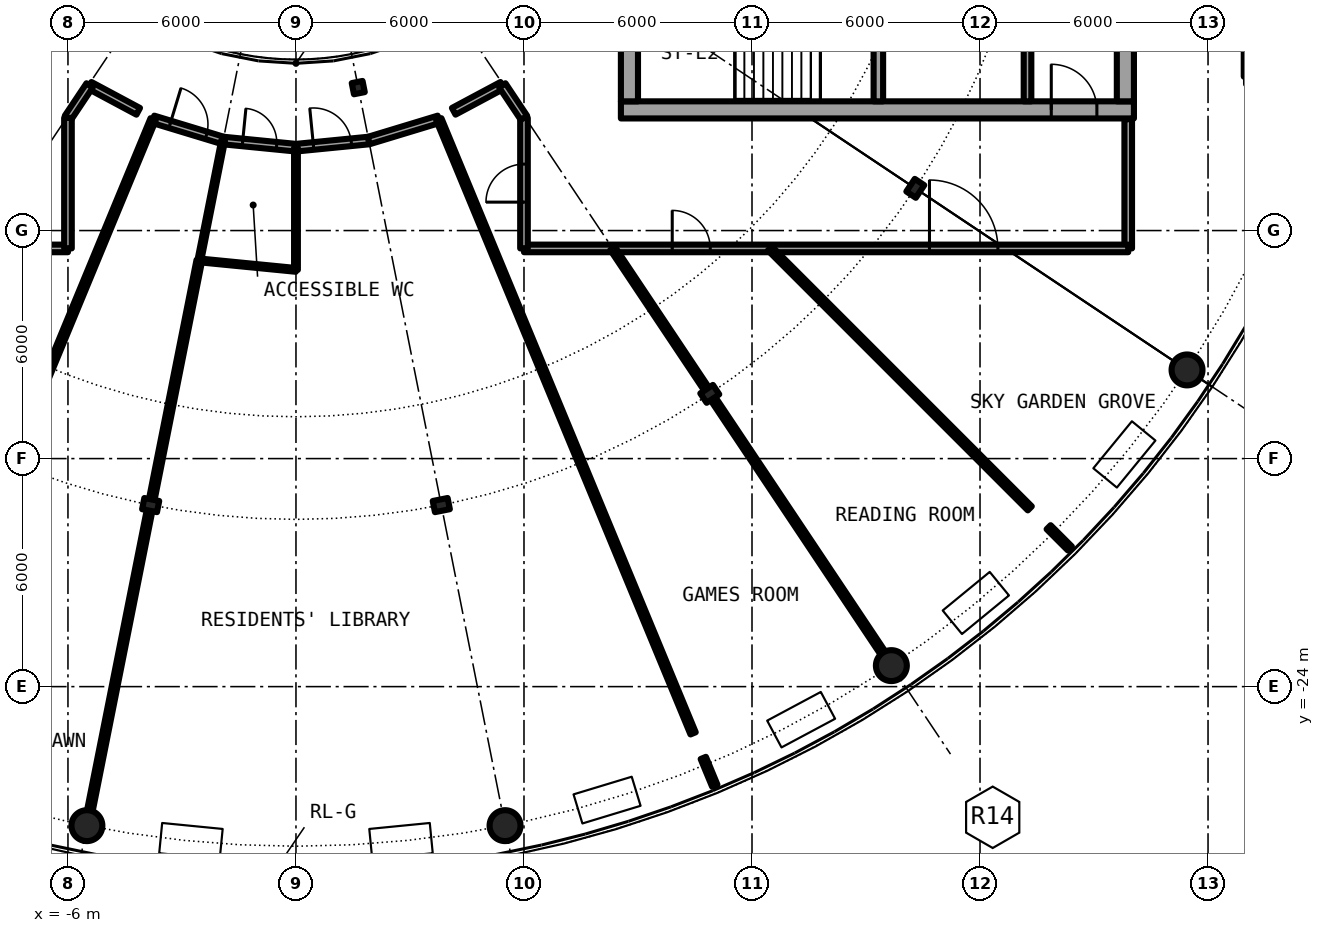
"""IFC4 building model, lengths in metres.
Left out: names, types, materials, properties, quantities, classifications, styles, units other than length and angle.
Written with IfcOpenShell. Run it as: python <this file> out.ifc"""

import sys

from ifc_helpers import new_model, si_unit, direction, frame, frame_2d, origin, origin_2d, place, context, subcontext, project, spatial, rectangle, hollow_circle, i_section, extrude, element, fill, save


model = new_model("IFC4")
c1 = context("Model", 3, precision=1e-05, world=origin(), true_north=direction((0.0, 1.0)))
c2 = subcontext(c1, "Body", "Model", "MODEL_VIEW")
j1 = project(units=[si_unit("LENGTHUNIT", "METRE"), si_unit("PLANEANGLEUNIT", "RADIAN")], contexts=[c1])
p1 = place(None, origin())
s1 = spatial("IfcSite", under=j1, at=p1, CompositionType="ELEMENT")
p2 = place(p1, origin())
s2 = spatial("IfcBuilding", under=s1, at=p2, CompositionType="ELEMENT")
p3 = place(p2, frame((0.0, 0.0, 221.85)))
s3 = spatial("IfcBuildingStorey", under=s2, at=p3, CompositionType="ELEMENT", Elevation=221.85)
for number, where, z_axis, x_axis in (
    (1, (-5.501, -27.658, 0.0), (0.0, 0.0, 1.0), (1.0, 0.0, 0.0)),
    (2, (5.501, -27.658, 0.0), (0.0, 0.0, 1.0), (1.0, 0.0, 0.0)),
    (3, (15.667, -23.448, 0.0), (0.0, 0.0, 1.0), (1.0, 0.0, 0.0)),
    (4, (23.448, -15.667, 0.0), (0.0, 0.0, 1.0), (1.0, 0.0, 0.0)),
):
    element("IfcColumn", number, at=place(p3, frame(where, z_axis=z_axis, x_axis=x_axis)), inside=s3, PredefinedType="COLUMN", context=c2, shape_type="SweptSolid", body=[
        extrude(hollow_circle(Radius=0.406, WallThickness=0.03, at=origin_2d()), origin(), (0.0, 0.0, 1.0), 6.1),
    ])
for number, where, z_axis, x_axis in (
    (5, (-3.824, -19.223, 0.0), (0.0, 0.0, 1.0), (-0.195, -0.981, 0.0)),
    (6, (3.824, -19.223, 0.0), (0.0, 0.0, 1.0), (0.195, -0.981, 0.0)),
    (7, (10.889, -16.297, 0.0), (0.0, 0.0, 1.0), (0.556, -0.831, 0.0)),
    (8, (16.297, -10.889, 0.0), (0.0, 0.0, 1.0), (0.831, -0.556, 0.0)),
):
    element("IfcColumn", number, at=place(p3, frame(where, z_axis=z_axis, x_axis=x_axis)), inside=s3, PredefinedType="COLUMN", context=c2, shape_type="SweptSolid", body=[
        extrude(i_section(OverallWidth=0.3, OverallDepth=0.4, WebThickness=0.013, FlangeThickness=0.024, FilletRadius=0.027, at=origin_2d()), origin(), (0.0, 0.0, 1.0), 6.1),
    ])
p4 = place(p3, frame((1.639, -8.239, 0.0), z_axis=(0.0, 0.0, 1.0), x_axis=(0.195090322016, -0.980785280403, 0.0)))
e9 = element("IfcColumn", 9, at=p4, inside=s3, PredefinedType="COLUMN", context=c2, shape_type="SweptSolid", body=[
    extrude(i_section(OverallWidth=0.3, OverallDepth=0.29, WebThickness=0.009, FlangeThickness=0.014, FilletRadius=0.027, at=origin_2d()), origin(), (0.0, 0.0, 1.0), 6.1),
])
p5 = place(p3, frame((8.55, -8.825, 0.0), z_axis=(0.0, 0.0, 1.0), x_axis=(1.0, 0.0, 0.0)))
e10 = element("IfcWall", 10, at=p5, inside=s3, PredefinedType="SHEAR", context=c2, shape_type="SweptSolid", body=[
    extrude(rectangle(XDim=13.5, YDim=0.45, at=frame_2d((6.75, 0.0))), origin(), (0.0, 0.0, 1.0), 6.1),
])
p6 = place(p5, frame((11.325, 0.0, 0.0)))
e11 = element("IfcOpeningElement", 11, at=p6, cuts=e10, PredefinedType="OPENING", context=c2, shape_type="SweptSolid", body=[
    extrude(rectangle(XDim=1.2, YDim=2.3, at=frame_2d((0.6, 1.15))), frame((0.0, 0.235, 0.0), z_axis=(0.0, -1.0, 0.0), x_axis=(1.0, 0.0, 0.0)), (0.0, 0.0, 1.0), 0.47),
])
p7 = place(p3, frame((21.825, 8.6, 0.0), z_axis=(0.0, 0.0, 1.0), x_axis=(0.0, -1.0, 0.0)))
e12 = element("IfcWall", 12, at=p7, inside=s3, PredefinedType="SHEAR", context=c2, shape_type="SweptSolid", body=[
    extrude(rectangle(XDim=17.2, YDim=0.45, at=frame_2d((8.6, 0.0))), origin(), (0.0, 0.0, 1.0), 6.1),
])
p8 = place(p7, frame((7.4, 0.0, 0.0)))
e13 = element("IfcOpeningElement", 13, at=p8, cuts=e12, PredefinedType="OPENING", context=c2, shape_type="SweptSolid", body=[
    extrude(rectangle(XDim=2.4, YDim=2.3, at=frame_2d((1.2, 1.15))), frame((0.0, 0.235, 0.0), z_axis=(0.0, -1.0, 0.0), x_axis=(1.0, 0.0, 0.0)), (0.0, 0.0, 1.0), 0.47),
])
p9 = place(p3, frame((8.775, -8.6, 0.0), z_axis=(0.0, 0.0, 1.0), x_axis=(0.0, 1.0, 0.0)))
e14 = element("IfcWall", 14, at=p9, inside=s3, PredefinedType="SHEAR", context=c2, shape_type="SweptSolid", body=[
    extrude(rectangle(XDim=17.2, YDim=0.45, at=frame_2d((8.6, 0.0))), origin(), (0.0, 0.0, 1.0), 6.1),
])
p10 = place(p9, frame((7.4, 0.0, 0.1)))
e15 = element("IfcOpeningElement", 15, at=p10, cuts=e14, PredefinedType="OPENING", context=c2, shape_type="SweptSolid", body=[
    extrude(rectangle(XDim=2.4, YDim=2.2, at=frame_2d((1.2, 1.1))), frame((0.0, 0.235, 0.0), z_axis=(0.0, -1.0, 0.0), x_axis=(1.0, 0.0, 0.0)), (0.0, 0.0, 1.0), 0.47),
])
p11 = place(p3, frame((15.325, -8.6, 0.0), z_axis=(0.0, 0.0, 1.0), x_axis=(0.0, 1.0, 0.0)))
e16 = element("IfcWall", 16, at=p11, inside=s3, PredefinedType="SHEAR", context=c2, shape_type="SweptSolid", body=[
    extrude(rectangle(XDim=3.95, YDim=0.25, at=frame_2d((1.975, 0.0))), origin(), (0.0, 0.0, 1.0), 6.1),
])
p12 = place(p11, frame((2.025, 0.0, 0.0)))
e17 = element("IfcOpeningElement", 17, at=p12, cuts=e16, PredefinedType="OPENING", context=c2, shape_type="SweptSolid", body=[
    extrude(rectangle(XDim=1.2, YDim=2.3, at=frame_2d((0.6, 1.15))), frame((0.0, 0.135, 0.0), z_axis=(0.0, -1.0, 0.0), x_axis=(1.0, 0.0, 0.0)), (0.0, 0.0, 1.0), 0.27),
])
p13 = place(p3, frame((19.25, -8.6, 0.0), z_axis=(0.0, 0.0, 1.0), x_axis=(0.0, 1.0, 0.0)))
e18 = element("IfcWall", 18, at=p13, inside=s3, PredefinedType="SOLIDWALL", context=c2, shape_type="SweptSolid", body=[
    extrude(rectangle(XDim=7.025, YDim=0.2, at=frame_2d((3.513, 0.0))), origin(), (0.0, 0.0, 1.0), 5.75),
])
p14 = place(p13, frame((2.35, 0.0, 0.0)))
e19 = element("IfcOpeningElement", 19, at=p14, cuts=e18, PredefinedType="OPENING", context=c2, shape_type="SweptSolid", body=[
    extrude(rectangle(XDim=1.1, YDim=2.3, at=frame_2d((0.55, 1.15))), frame((0.0, 0.11, 0.0), z_axis=(0.0, -1.0, 0.0), x_axis=(1.0, 0.0, 0.0)), (0.0, 0.0, 1.0), 0.22),
])
p15 = place(p3, frame((25.0, -3.5, 0.0), z_axis=(0.0, 0.0, 1.0), x_axis=(0.0, -1.0, 0.0)))
e20 = element("IfcWall", 20, at=p15, inside=s3, PredefinedType="PARTITIONING", context=c2, shape_type="SweptSolid", body=[
    extrude(rectangle(XDim=4.45, YDim=0.12, at=frame_2d((2.225, 0.0))), origin(), (0.0, 0.0, 1.0), 5.75),
])
p16 = place(p15, frame((0.4, 0.0, 0.1)))
e21 = element("IfcOpeningElement", 21, at=p16, cuts=e20, PredefinedType="OPENING", context=c2, shape_type="SweptSolid", body=[
    extrude(rectangle(XDim=3.6, YDim=5.4, at=frame_2d((1.8, 2.7))), frame((0.0, 0.07, 0.0), z_axis=(0.0, -1.0, 0.0), x_axis=(1.0, 0.0, 0.0)), (0.0, 0.0, 1.0), 0.14),
])
p17 = place(p3, frame((21.9, -12.47, 0.0), z_axis=(0.0, 0.0, 1.0), x_axis=(0.0, 1.0, 0.0)))
e22 = element("IfcWall", 22, at=p17, inside=s3, PredefinedType="PARTITIONING", context=c2, shape_type="SweptSolid", body=[
    extrude(rectangle(XDim=3.4, YDim=0.2, at=frame_2d((1.7, 0.0))), origin(), (0.0, 0.0, 1.0), 5.75),
])
p18 = place(p3, frame((-2.543, -12.785, 0.0), z_axis=(0.0, 0.0, 1.0), x_axis=(0.995202292453, -0.09783862783, 0.0)))
e23 = element("IfcWall", 23, at=p18, inside=s3, PredefinedType="PARTITIONING", context=c2, shape_type="SweptSolid", body=[
    extrude(rectangle(XDim=2.555, YDim=0.1, at=frame_2d((1.278, 0.0))), origin(), (0.0, 0.0, 1.0), 5.75),
])
p19 = place(p3, frame((-21.9, -12.47, 0.0), z_axis=(0.0, 0.0, 1.0), x_axis=(1.0, 0.0, 0.0)))
e24 = element("IfcWall", 24, at=p19, inside=s3, PredefinedType="PARTITIONING", context=c2, shape_type="SweptSolid", body=[
    extrude(rectangle(XDim=15.9, YDim=0.2, at=frame_2d((7.95, 0.0))), origin(), (0.0, 0.0, 1.0), 5.75),
])
p20 = place(p19, frame((12.165, 0.0, 0.0)))
e25 = element("IfcOpeningElement", 25, at=p20, cuts=e24, PredefinedType="OPENING", context=c2, shape_type="SweptSolid", body=[
    extrude(rectangle(XDim=1.0, YDim=2.3, at=frame_2d((0.5, 1.15))), frame((0.0, 0.11, 0.0), z_axis=(0.0, -1.0, 0.0), x_axis=(1.0, 0.0, 0.0)), (0.0, 0.0, 1.0), 0.22),
])
p21 = place(p19, frame((3.387, 0.0, 0.0)))
e26 = element("IfcOpeningElement", 26, at=p21, cuts=e24, PredefinedType="OPENING", context=c2, shape_type="SweptSolid", body=[
    extrude(rectangle(XDim=1.8, YDim=2.3, at=frame_2d((0.9, 1.15))), frame((0.0, 0.11, 0.0), z_axis=(0.0, -1.0, 0.0), x_axis=(1.0, 0.0, 0.0)), (0.0, 0.0, 1.0), 0.22),
])
p22 = place(p3, frame((6.0, -12.47, 0.0), z_axis=(0.0, 0.0, 1.0), x_axis=(1.0, 0.0, 0.0)))
e27 = element("IfcWall", 27, at=p22, inside=s3, PredefinedType="PARTITIONING", context=c2, shape_type="SweptSolid", body=[
    extrude(rectangle(XDim=15.9, YDim=0.2, at=frame_2d((7.95, 0.0))), origin(), (0.0, 0.0, 1.0), 5.75),
])
p23 = place(p22, frame((3.901, 0.0, 0.0)))
e28 = element("IfcOpeningElement", 28, at=p23, cuts=e27, PredefinedType="OPENING", context=c2, shape_type="SweptSolid", body=[
    extrude(rectangle(XDim=1.0, YDim=2.3, at=frame_2d((0.5, 1.15))), frame((0.0, 0.11, 0.0), z_axis=(0.0, -1.0, 0.0), x_axis=(1.0, 0.0, 0.0)), (0.0, 0.0, 1.0), 0.22),
])
p24 = place(p22, frame((10.67, 0.0, 0.0)))
e29 = element("IfcOpeningElement", 29, at=p24, cuts=e27, PredefinedType="OPENING", context=c2, shape_type="SweptSolid", body=[
    extrude(rectangle(XDim=1.8, YDim=2.3, at=frame_2d((0.9, 1.15))), frame((0.0, 0.11, 0.0), z_axis=(0.0, -1.0, 0.0), x_axis=(1.0, 0.0, 0.0)), (0.0, 0.0, 1.0), 0.22),
])
p25 = place(p3, frame((-5.429, -8.179, 0.0), z_axis=(0.0, 0.0, 1.0), x_axis=(0.881652665802, -0.471898905364, 0.0)))
e30 = element("IfcWall", 30, at=p25, inside=s3, PredefinedType="PARTITIONING", context=c2, shape_type="SweptSolid", body=[
    extrude(rectangle(XDim=1.45, YDim=0.2, at=frame_2d((0.725, 0.0))), origin(), (0.0, 0.0, 1.0), 5.75),
])
p26 = place(p3, frame((-3.758, -9.072, 0.0), z_axis=(0.0, 0.0, 1.0), x_axis=(0.956896312675, -0.29042976223, 0.0)))
e31 = element("IfcWall", 31, at=p26, inside=s3, PredefinedType="PARTITIONING", context=c2, shape_type="SweptSolid", body=[
    extrude(rectangle(XDim=1.925, YDim=0.2, at=frame_2d((0.962, 0.0))), origin(), (0.0, 0.0, 1.0), 5.75),
])
p27 = place(p26, frame((0.462, 0.0, 0.0)))
e32 = element("IfcOpeningElement", 32, at=p27, cuts=e31, PredefinedType="OPENING", context=c2, shape_type="SweptSolid", body=[
    extrude(rectangle(XDim=1.0, YDim=2.3, at=frame_2d((0.5, 1.15))), frame((0.0, 0.11, 0.0), z_axis=(0.0, -1.0, 0.0), x_axis=(1.0, 0.0, 0.0)), (0.0, 0.0, 1.0), 0.22),
])
p28 = place(p3, frame((-1.916, -9.631, 0.0), z_axis=(0.0, 0.0, 1.0), x_axis=(0.995171860647, -0.098147683504, 0.0)))
e33 = element("IfcWall", 33, at=p28, inside=s3, PredefinedType="PARTITIONING", context=c2, shape_type="SweptSolid", body=[
    extrude(rectangle(XDim=1.925, YDim=0.2, at=frame_2d((0.963, 0.0))), origin(), (0.0, 0.0, 1.0), 5.75),
])
p29 = place(p28, frame((0.513, 0.0, 0.0)))
e34 = element("IfcOpeningElement", 34, at=p29, cuts=e33, PredefinedType="OPENING", context=c2, shape_type="SweptSolid", body=[
    extrude(rectangle(XDim=0.9, YDim=2.3, at=frame_2d((0.45, 1.15))), frame((0.0, 0.11, 0.0), z_axis=(0.0, -1.0, 0.0), x_axis=(1.0, 0.0, 0.0)), (0.0, 0.0, 1.0), 0.22),
])
p30 = place(p3, frame((0.0, -9.82, 0.0), z_axis=(0.0, 0.0, 1.0), x_axis=(0.995171860647, 0.098147683504, 0.0)))
e35 = element("IfcWall", 35, at=p30, inside=s3, PredefinedType="PARTITIONING", context=c2, shape_type="SweptSolid", body=[
    extrude(rectangle(XDim=1.925, YDim=0.2, at=frame_2d((0.963, 0.0))), origin(), (0.0, 0.0, 1.0), 5.75),
])
p31 = place(p30, frame((0.463, 0.0, 0.0)))
e36 = element("IfcOpeningElement", 36, at=p31, cuts=e35, PredefinedType="OPENING", context=c2, shape_type="SweptSolid", body=[
    extrude(rectangle(XDim=1.0, YDim=2.3, at=frame_2d((0.5, 1.15))), frame((0.0, 0.11, 0.0), z_axis=(0.0, -1.0, 0.0), x_axis=(1.0, 0.0, 0.0)), (0.0, 0.0, 1.0), 0.22),
])
p32 = place(p3, frame((1.916, -9.631, 0.0), z_axis=(0.0, 0.0, 1.0), x_axis=(0.956896312675, 0.29042976223, 0.0)))
e37 = element("IfcWall", 37, at=p32, inside=s3, PredefinedType="PARTITIONING", context=c2, shape_type="SweptSolid", body=[
    extrude(rectangle(XDim=1.925, YDim=0.2, at=frame_2d((0.962, 0.0))), origin(), (0.0, 0.0, 1.0), 5.75),
])
p33 = place(p3, frame((4.151, -8.862, 0.0), z_axis=(0.0, 0.0, 1.0), x_axis=(0.88193287619, 0.471375011954, 0.0)))
e38 = element("IfcWall", 38, at=p33, inside=s3, PredefinedType="PARTITIONING", context=c2, shape_type="SweptSolid", body=[
    extrude(rectangle(XDim=1.449, YDim=0.2, at=frame_2d((0.725, 0.0))), origin(), (0.0, 0.0, 1.0), 5.75),
])
p34 = place(p3, frame((6.0, -12.47, 0.0), z_axis=(0.0, 0.0, 1.0), x_axis=(0.0, 1.0, 0.0)))
e39 = element("IfcWall", 39, at=p34, inside=s3, PredefinedType="PARTITIONING", context=c2, shape_type="SweptSolid", body=[
    extrude(rectangle(XDim=3.436, YDim=0.2, at=frame_2d((1.718, 0.0))), origin(), (0.0, 0.0, 1.0), 5.75),
])
p35 = place(p34, frame((1.218, 0.0, 0.0)))
e40 = element("IfcOpeningElement", 40, at=p35, cuts=e39, PredefinedType="OPENING", context=c2, shape_type="SweptSolid", body=[
    extrude(rectangle(XDim=1.0, YDim=2.3, at=frame_2d((0.5, 1.15))), frame((0.0, 0.11, 0.0), z_axis=(0.0, -1.0, 0.0), x_axis=(1.0, 0.0, 0.0)), (0.0, 0.0, 1.0), 0.22),
])
for number, where, z_axis, x_axis in (
    (41, (-6.0, -9.034, 0.0), (0.0, 0.0, 1.0), (0.555, 0.832, 0.0)),
    (42, (5.429, -8.179, 0.0), (0.0, 0.0, 1.0), (0.555, -0.832, 0.0)),
):
    element("IfcWall", number, at=place(p3, frame(where, z_axis=z_axis, x_axis=x_axis)), inside=s3, PredefinedType="PARTITIONING", context=c2, shape_type="SweptSolid", body=[
        extrude(rectangle(XDim=1.028, YDim=0.2, at=frame_2d((0.514, 0.0))), origin(), (0.0, 0.0, 1.0), 5.75),
    ])
p36 = place(p3, frame((-10.45, -25.23, 0.0), z_axis=(0.0, 0.0, 1.0), x_axis=(0.382637007118, 0.923898761112, 0.0)))
e43 = element("IfcWall", 43, at=p36, inside=s3, PredefinedType="PARTITIONING", context=c2, shape_type="SweptSolid", body=[
    extrude(rectangle(XDim=17.489, YDim=0.15, at=frame_2d((8.744, 0.0))), origin(), (0.0, 0.0, 1.0), 5.75),
])
p37 = place(p3, frame((-5.424, -27.267, 0.0), z_axis=(0.0, 0.0, 1.0), x_axis=(0.195106720959, 0.980782018308, 0.0)))
e44 = element("IfcWall", 44, at=p37, inside=s3, PredefinedType="PARTITIONING", context=c2, shape_type="SweptSolid", body=[
    extrude(rectangle(XDim=8.001, YDim=0.15, at=frame_2d((4.0, 0.0))), origin(), (0.0, 0.0, 1.0), 5.75),
])
p38 = place(p3, frame((-3.785, -19.027, 0.0), z_axis=(0.0, 0.0, 1.0), x_axis=(0.195134918279, 0.980776408601, 0.0)))
e45 = element("IfcWall", 45, at=p38, inside=s3, PredefinedType="PARTITIONING", context=c2, shape_type="SweptSolid", body=[
    extrude(rectangle(XDim=6.365, YDim=0.15, at=frame_2d((3.182, 0.0))), origin(), (0.0, 0.0, 1.0), 5.75),
])
p39 = place(p3, frame((-2.543, -12.785, 0.0), z_axis=(0.0, 0.0, 1.0), x_axis=(0.194977117829, 0.980807791325, 0.0)))
e46 = element("IfcWall", 46, at=p39, inside=s3, PredefinedType="PARTITIONING", context=c2, shape_type="SweptSolid", body=[
    extrude(rectangle(XDim=3.216, YDim=0.1, at=frame_2d((1.608, 0.0))), origin(), (0.0, 0.0, 1.0), 5.75),
])
p40 = place(p3, frame((0.0, -13.035, 0.0), z_axis=(0.0, 0.0, 1.0), x_axis=(0.0, 1.0, 0.0)))
e47 = element("IfcWall", 47, at=p40, inside=s3, PredefinedType="PARTITIONING", context=c2, shape_type="SweptSolid", body=[
    extrude(rectangle(XDim=3.215, YDim=0.1, at=frame_2d((1.607, 0.0))), origin(), (0.0, 0.0, 1.0), 5.75),
])
p41 = place(p3, frame((3.758, -9.072, 0.0), z_axis=(0.0, 0.0, 1.0), x_axis=(0.382637007118, -0.923898761112, 0.0)))
e48 = element("IfcWall", 48, at=p41, inside=s3, PredefinedType="PARTITIONING", context=c2, shape_type="SweptSolid", body=[
    extrude(rectangle(XDim=17.489, YDim=0.15, at=frame_2d((8.744, 0.0))), origin(), (0.0, 0.0, 1.0), 5.75),
])
p42 = place(p3, frame((8.332, -12.47, 0.0), z_axis=(0.0, 0.0, 1.0), x_axis=(0.555531636289, -0.831495400518, 0.0)))
e49 = element("IfcWall", 49, at=p42, inside=s3, PredefinedType="PARTITIONING", context=c2, shape_type="SweptSolid", body=[
    extrude(rectangle(XDim=4.403, YDim=0.15, at=frame_2d((2.202, 0.0))), origin(), (0.0, 0.0, 1.0), 5.75),
])
p43 = place(p3, frame((10.718, -25.876, 0.0), z_axis=(0.0, 0.0, 1.0), x_axis=(0.382469748433, -0.923968014345, 0.0)))
e50 = element("IfcWall", 50, at=p43, inside=s3, PredefinedType="PARTITIONING", context=c2, shape_type="SweptSolid", body=[
    extrude(rectangle(XDim=0.792, YDim=0.15, at=frame_2d((0.396, 0.0))), origin(), (0.0, 0.0, 1.0), 5.75),
])
p44 = place(p3, frame((11.0, -16.463, 0.0), z_axis=(0.0, 0.0, 1.0), x_axis=(0.555537830231, -0.831491262241, 0.0)))
e51 = element("IfcWall", 51, at=p44, inside=s3, PredefinedType="PARTITIONING", context=c2, shape_type="SweptSolid", body=[
    extrude(rectangle(XDim=8.001, YDim=0.15, at=frame_2d((4.001, 0.0))), origin(), (0.0, 0.0, 1.0), 5.75),
])
p45 = place(p3, frame((12.47, -12.47, 0.0), z_axis=(0.0, 0.0, 1.0), x_axis=(0.707106781187, -0.707106781187, 0.0)))
e52 = element("IfcWall", 52, at=p45, inside=s3, PredefinedType="PARTITIONING", context=c2, shape_type="SweptSolid", body=[
    extrude(rectangle(XDim=9.673, YDim=0.15, at=frame_2d((4.837, 0.0))), origin(), (0.0, 0.0, 1.0), 5.75),
])
p46 = place(p3, frame((19.805, -19.805, 0.0), z_axis=(0.0, 0.0, 1.0), x_axis=(0.707106781187, -0.707106781187, 0.0)))
e53 = element("IfcWall", 53, at=p46, inside=s3, PredefinedType="PARTITIONING", context=c2, shape_type="SweptSolid", body=[
    extrude(rectangle(XDim=0.792, YDim=0.15, at=frame_2d((0.396, 0.0))), origin(), (0.0, 0.0, 1.0), 5.75),
])
p47 = place(p3, frame((-6.0, -12.47, 0.0), z_axis=(0.0, 0.0, 1.0), x_axis=(0.0, 1.0, 0.0)))
e54 = element("IfcWall", 54, at=p47, inside=s3, PredefinedType="PARTITIONING", context=c2, shape_type="SweptSolid", body=[
    extrude(rectangle(XDim=3.436, YDim=0.2, at=frame_2d((1.718, 0.0))), origin(), (0.0, 0.0, 1.0), 5.75),
])
p48 = place(p6, origin())
e55 = element("IfcDoor", 55, at=p48, inside=s3, OperationType="SINGLE_SWING_LEFT", PredefinedType="DOOR", context=c2, shape_type="SweptSolid", body=[
    extrude(rectangle(XDim=1.2, YDim=2.3, at=frame_2d((0.6, 1.15))), frame((0.0, 0.025, 0.0), z_axis=(0.0, -1.0, 0.0), x_axis=(1.0, 0.0, 0.0)), (0.0, 0.0, 1.0), 0.05),
])
fill(e11, e55)
p49 = place(p29, origin())
e56 = element("IfcDoor", 56, at=p49, inside=s3, OperationType="SINGLE_SWING_RIGHT", PredefinedType="DOOR", context=c2, shape_type="SweptSolid", body=[
    extrude(rectangle(XDim=0.9, YDim=2.3, at=frame_2d((0.45, 1.15))), frame((0.0, 0.025, 0.0), z_axis=(0.0, -1.0, 0.0), x_axis=(1.0, 0.0, 0.0)), (0.0, 0.0, 1.0), 0.05),
])
fill(e34, e56)
p50 = place(p31, origin())
e57 = element("IfcDoor", 57, at=p50, inside=s3, OperationType="SINGLE_SWING_LEFT", PredefinedType="DOOR", context=c2, shape_type="SweptSolid", body=[
    extrude(rectangle(XDim=1.0, YDim=2.3, at=frame_2d((0.5, 1.15))), frame((0.0, 0.025, 0.0), z_axis=(0.0, -1.0, 0.0), x_axis=(1.0, 0.0, 0.0)), (0.0, 0.0, 1.0), 0.05),
])
fill(e36, e57)
p51 = place(p35, origin())
e58 = element("IfcDoor", 58, at=p51, inside=s3, OperationType="SINGLE_SWING_LEFT", PredefinedType="DOOR", context=c2, shape_type="SweptSolid", body=[
    extrude(rectangle(XDim=1.0, YDim=2.3, at=frame_2d((0.5, 1.15))), frame((0.0, 0.025, 0.0), z_axis=(0.0, -1.0, 0.0), x_axis=(1.0, 0.0, 0.0)), (0.0, 0.0, 1.0), 0.05),
])
fill(e40, e58)
p52 = place(p23, origin())
e59 = element("IfcDoor", 59, at=p52, inside=s3, OperationType="SINGLE_SWING_LEFT", PredefinedType="DOOR", context=c2, shape_type="SweptSolid", body=[
    extrude(rectangle(XDim=1.0, YDim=2.3, at=frame_2d((0.5, 1.15))), frame((0.0, 0.025, 0.0), z_axis=(0.0, -1.0, 0.0), x_axis=(1.0, 0.0, 0.0)), (0.0, 0.0, 1.0), 0.05),
])
fill(e28, e59)
p53 = place(p27, origin())
e60 = element("IfcDoor", 60, at=p53, inside=s3, OperationType="SINGLE_SWING_LEFT", PredefinedType="DOOR", context=c2, shape_type="SweptSolid", body=[
    extrude(rectangle(XDim=1.0, YDim=2.3, at=frame_2d((0.5, 1.15))), frame((0.0, 0.025, 0.0), z_axis=(0.0, -1.0, 0.0), x_axis=(1.0, 0.0, 0.0)), (0.0, 0.0, 1.0), 0.05),
])
fill(e32, e60)
p54 = place(p24, origin())
e61 = element("IfcDoor", 61, at=p54, inside=s3, OperationType="DOUBLE_DOOR_SINGLE_SWING", PredefinedType="DOOR", context=c2, shape_type="SweptSolid", body=[
    extrude(rectangle(XDim=1.8, YDim=2.3, at=frame_2d((0.9, 1.15))), frame((0.0, 0.025, 0.0), z_axis=(0.0, -1.0, 0.0), x_axis=(1.0, 0.0, 0.0)), (0.0, 0.0, 1.0), 0.05),
])
fill(e29, e61)
save(model, sys.argv[1])
